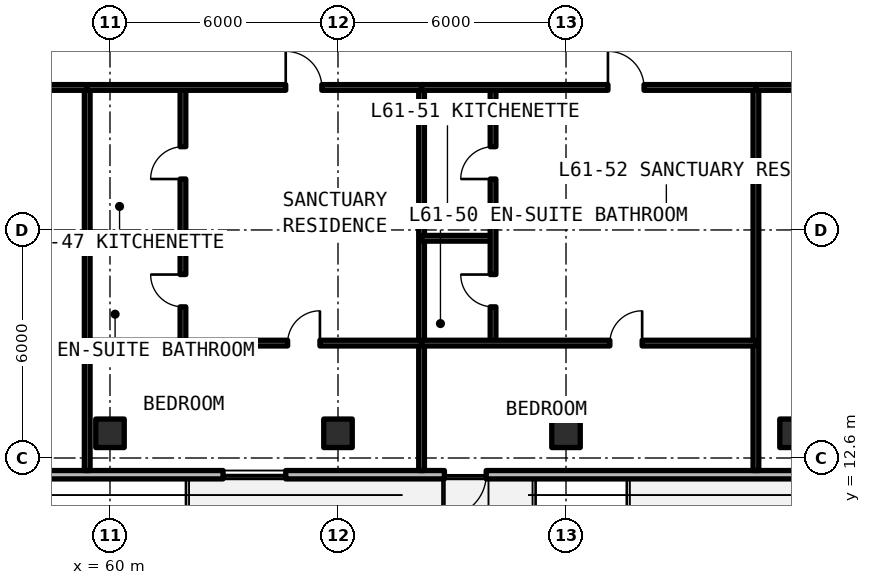
"""IFC4 building model, lengths in metres.
Left out: names, types, materials, properties, quantities, classifications, styles, units other than length and angle.
Written with IfcOpenShell. Run it as: python <this file> out.ifc"""

import sys

from ifc_helpers import new_model, si_unit, direction, frame, frame_2d, origin, origin_2d, place, context, subcontext, project, spatial, rectangle, extrude, element, fill, save


model = new_model("IFC4")
c1 = context("Model", 3, precision=1e-05, world=origin(), true_north=direction((0.0, 1.0)))
c2 = subcontext(c1, "Body", "Model", "MODEL_VIEW")
j1 = project(units=[si_unit("LENGTHUNIT", "METRE"), si_unit("PLANEANGLEUNIT", "RADIAN")], contexts=[c1])
p1 = place(None, origin())
s1 = spatial("IfcSite", under=j1, at=p1, CompositionType="ELEMENT")
p2 = place(p1, origin())
s2 = spatial("IfcBuilding", under=s1, at=p2, CompositionType="ELEMENT")
p3 = place(p2, frame((0.0, 0.0, 219.12)))
s3 = spatial("IfcBuildingStorey", under=s2, at=p3, CompositionType="ELEMENT", Elevation=219.12)
for number, where, z_axis, x_axis in (
    (1, (60.0, 13.25, 0.0), (0.0, 0.0, 1.0), (1.0, 0.0, 0.0)),
    (2, (66.0, 13.25, 0.0), (0.0, 0.0, 1.0), (1.0, 0.0, 0.0)),
    (3, (72.0, 13.25, 0.0), (0.0, 0.0, 1.0), (1.0, 0.0, 0.0)),
    (4, (78.0, 13.25, 0.0), (0.0, 0.0, 1.0), (1.0, 0.0, 0.0)),
):
    element("IfcColumn", number, at=place(p3, frame(where, z_axis=z_axis, x_axis=x_axis)), inside=s3, PredefinedType="COLUMN", context=c2, shape_type="SweptSolid", body=[
        extrude(rectangle(XDim=0.75, YDim=0.75, at=origin_2d()), origin(), (0.0, 0.0, 1.0), 3.63),
    ])
p4 = place(p3, frame((52.11, 12.16, 0.0), z_axis=(0.0, 0.0, 1.0), x_axis=(1.0, 0.0, 0.0)))
e5 = element("IfcWall", 5, at=p4, inside=s3, PredefinedType="SOLIDWALL", context=c2, shape_type="SweptSolid", body=[
    extrude(rectangle(XDim=43.244, YDim=0.22, at=frame_2d((21.622, 0.0))), origin(), (0.0, 0.0, 1.0), 3.41),
])
p5 = place(p4, frame((16.69, 0.0, 0.0)))
e6 = element("IfcOpeningElement", 6, at=p5, cuts=e5, PredefinedType="OPENING", context=c2, shape_type="SweptSolid", body=[
    extrude(rectangle(XDim=1.1, YDim=2.15, at=frame_2d((0.55, 1.075))), frame((0.0, 0.12, 0.0), z_axis=(0.0, -1.0, 0.0), x_axis=(1.0, 0.0, 0.0)), (0.0, 0.0, 1.0), 0.24),
])
p6 = place(p4, frame((27.79, 0.0, 0.0)))
e7 = element("IfcOpeningElement", 7, at=p6, cuts=e5, PredefinedType="OPENING", context=c2, shape_type="SweptSolid", body=[
    extrude(rectangle(XDim=1.1, YDim=2.15, at=frame_2d((0.55, 1.075))), frame((0.0, 0.12, 0.0), z_axis=(0.0, -1.0, 0.0), x_axis=(1.0, 0.0, 0.0)), (0.0, 0.0, 1.0), 0.24),
])
p7 = place(p4, frame((2.826, 0.0, 0.78)))
e8 = element("IfcOpeningElement", 8, at=p7, cuts=e5, PredefinedType="OPENING", context=c2, shape_type="SweptSolid", body=[
    extrude(rectangle(XDim=1.65, YDim=1.66, at=frame_2d((0.825, 0.83))), frame((0.0, 0.12, 0.0), z_axis=(0.0, -1.0, 0.0), x_axis=(1.0, 0.0, 0.0)), (0.0, 0.0, 1.0), 0.24),
])
p8 = place(p4, frame((10.865, 0.0, 0.78)))
e9 = element("IfcOpeningElement", 9, at=p8, cuts=e5, PredefinedType="OPENING", context=c2, shape_type="SweptSolid", body=[
    extrude(rectangle(XDim=1.65, YDim=1.66, at=frame_2d((0.825, 0.83))), frame((0.0, 0.12, 0.0), z_axis=(0.0, -1.0, 0.0), x_axis=(1.0, 0.0, 0.0)), (0.0, 0.0, 1.0), 0.24),
])
p9 = place(p4, frame((38.666, 0.0, 0.78)))
e10 = element("IfcOpeningElement", 10, at=p9, cuts=e5, PredefinedType="OPENING", context=c2, shape_type="SweptSolid", body=[
    extrude(rectangle(XDim=1.65, YDim=1.66, at=frame_2d((0.825, 0.83))), frame((0.0, 0.12, 0.0), z_axis=(0.0, -1.0, 0.0), x_axis=(1.0, 0.0, 0.0)), (0.0, 0.0, 1.0), 0.24),
])
p10 = place(p3, frame((59.401, 12.27, 0.0), z_axis=(0.0, 0.0, 1.0), x_axis=(0.0, 1.0, 0.0)))
e11 = element("IfcWall", 11, at=p10, inside=s3, PredefinedType="SOLIDWALL", context=c2, shape_type="SweptSolid", body=[
    extrude(rectangle(XDim=10.08, YDim=0.15, at=frame_2d((5.04, 0.0))), origin(), (0.0, 0.0, 1.0), 2.63),
])
p11 = place(p3, frame((52.12, 22.35, 0.0), z_axis=(0.0, 0.0, 1.0), x_axis=(1.0, 0.0, 0.0)))
e12 = element("IfcWall", 12, at=p11, inside=s3, PredefinedType="SOLIDWALL", context=c2, shape_type="SweptSolid", body=[
    extrude(rectangle(XDim=7.281, YDim=0.15, at=frame_2d((3.641, 0.0))), origin(), (0.0, 0.0, 1.0), 2.63),
])
p12 = place(p11, frame((3.166, 0.0, 0.0)))
e13 = element("IfcOpeningElement", 13, at=p12, cuts=e12, PredefinedType="OPENING", context=c2, shape_type="SweptSolid", body=[
    extrude(rectangle(XDim=0.95, YDim=2.15, at=frame_2d((0.475, 1.075))), frame((0.0, 0.085, 0.0), z_axis=(0.0, -1.0, 0.0), x_axis=(1.0, 0.0, 0.0)), (0.0, 0.0, 1.0), 0.17),
])
p13 = place(p3, frame((68.199, 12.27, 0.0), z_axis=(0.0, 0.0, 1.0), x_axis=(0.0, 1.0, 0.0)))
e14 = element("IfcWall", 14, at=p13, inside=s3, PredefinedType="SOLIDWALL", context=c2, shape_type="SweptSolid", body=[
    extrude(rectangle(XDim=10.08, YDim=0.15, at=frame_2d((5.04, 0.0))), origin(), (0.0, 0.0, 1.0), 2.63),
])
p14 = place(p3, frame((59.401, 18.381, 0.0), z_axis=(0.0, 0.0, 1.0), x_axis=(1.0, 0.0, 0.0)))
e15 = element("IfcWall", 15, at=p14, inside=s3, PredefinedType="PARTITIONING", context=c2, shape_type="SweptSolid", body=[
    extrude(rectangle(XDim=2.519, YDim=0.15, at=frame_2d((1.259, 0.0))), origin(), (0.0, 0.0, 1.0), 2.63),
])
p15 = place(p3, frame((61.92, 15.623, 0.0), z_axis=(0.0, 0.0, 1.0), x_axis=(0.0, 1.0, 0.0)))
e16 = element("IfcWall", 16, at=p15, inside=s3, PredefinedType="PARTITIONING", context=c2, shape_type="SweptSolid", body=[
    extrude(rectangle(XDim=6.727, YDim=0.15, at=frame_2d((3.364, 0.0))), origin(), (0.0, 0.0, 1.0), 2.63),
])
p16 = place(p15, frame((0.954, 0.0, 0.0)))
e17 = element("IfcOpeningElement", 17, at=p16, cuts=e16, PredefinedType="OPENING", context=c2, shape_type="SweptSolid", body=[
    extrude(rectangle(XDim=0.85, YDim=2.1, at=frame_2d((0.425, 1.05))), frame((0.0, 0.085, 0.0), z_axis=(0.0, -1.0, 0.0), x_axis=(1.0, 0.0, 0.0)), (0.0, 0.0, 1.0), 0.17),
])
p17 = place(p15, frame((4.318, 0.0, 0.0)))
e18 = element("IfcOpeningElement", 18, at=p17, cuts=e16, PredefinedType="OPENING", context=c2, shape_type="SweptSolid", body=[
    extrude(rectangle(XDim=0.85, YDim=2.1, at=frame_2d((0.425, 1.05))), frame((0.0, 0.085, 0.0), z_axis=(0.0, -1.0, 0.0), x_axis=(1.0, 0.0, 0.0)), (0.0, 0.0, 1.0), 0.17),
])
p18 = place(p3, frame((59.401, 15.623, 0.0), z_axis=(0.0, 0.0, 1.0), x_axis=(1.0, 0.0, 0.0)))
e19 = element("IfcWall", 19, at=p18, inside=s3, PredefinedType="PARTITIONING", context=c2, shape_type="SweptSolid", body=[
    extrude(rectangle(XDim=8.798, YDim=0.15, at=frame_2d((4.399, 0.0))), origin(), (0.0, 0.0, 1.0), 2.63),
])
p19 = place(p18, frame((5.273, 0.0, 0.0)))
e20 = element("IfcOpeningElement", 20, at=p19, cuts=e19, PredefinedType="OPENING", context=c2, shape_type="SweptSolid", body=[
    extrude(rectangle(XDim=0.85, YDim=2.1, at=frame_2d((0.425, 1.05))), frame((0.0, 0.085, 0.0), z_axis=(0.0, -1.0, 0.0), x_axis=(1.0, 0.0, 0.0)), (0.0, 0.0, 1.0), 0.17),
])
p20 = place(p3, frame((59.401, 22.35, 0.0), z_axis=(0.0, 0.0, 1.0), x_axis=(1.0, 0.0, 0.0)))
e21 = element("IfcWall", 21, at=p20, inside=s3, PredefinedType="SOLIDWALL", context=c2, shape_type="SweptSolid", body=[
    extrude(rectangle(XDim=8.798, YDim=0.15, at=frame_2d((4.399, 0.0))), origin(), (0.0, 0.0, 1.0), 2.63),
])
p21 = place(p20, frame((5.223, 0.0, 0.0)))
e22 = element("IfcOpeningElement", 22, at=p21, cuts=e21, PredefinedType="OPENING", context=c2, shape_type="SweptSolid", body=[
    extrude(rectangle(XDim=0.95, YDim=2.15, at=frame_2d((0.475, 1.075))), frame((0.0, 0.085, 0.0), z_axis=(0.0, -1.0, 0.0), x_axis=(1.0, 0.0, 0.0)), (0.0, 0.0, 1.0), 0.17),
])
p22 = place(p3, frame((76.997, 12.27, 0.0), z_axis=(0.0, 0.0, 1.0), x_axis=(0.0, 1.0, 0.0)))
e23 = element("IfcWall", 23, at=p22, inside=s3, PredefinedType="SOLIDWALL", context=c2, shape_type="SweptSolid", body=[
    extrude(rectangle(XDim=10.08, YDim=0.15, at=frame_2d((5.04, 0.0))), origin(), (0.0, 0.0, 1.0), 2.63),
])
p23 = place(p3, frame((68.199, 18.381, 0.0), z_axis=(0.0, 0.0, 1.0), x_axis=(1.0, 0.0, 0.0)))
e24 = element("IfcWall", 24, at=p23, inside=s3, PredefinedType="PARTITIONING", context=c2, shape_type="SweptSolid", body=[
    extrude(rectangle(XDim=1.881, YDim=0.15, at=frame_2d((0.94, 0.0))), origin(), (0.0, 0.0, 1.0), 2.63),
])
p24 = place(p3, frame((70.08, 15.623, 0.0), z_axis=(0.0, 0.0, 1.0), x_axis=(0.0, 1.0, 0.0)))
e25 = element("IfcWall", 25, at=p24, inside=s3, PredefinedType="PARTITIONING", context=c2, shape_type="SweptSolid", body=[
    extrude(rectangle(XDim=6.727, YDim=0.15, at=frame_2d((3.364, 0.0))), origin(), (0.0, 0.0, 1.0), 2.63),
])
p25 = place(p24, frame((0.954, 0.0, 0.0)))
e26 = element("IfcOpeningElement", 26, at=p25, cuts=e25, PredefinedType="OPENING", context=c2, shape_type="SweptSolid", body=[
    extrude(rectangle(XDim=0.85, YDim=2.1, at=frame_2d((0.425, 1.05))), frame((0.0, 0.085, 0.0), z_axis=(0.0, -1.0, 0.0), x_axis=(1.0, 0.0, 0.0)), (0.0, 0.0, 1.0), 0.17),
])
p26 = place(p24, frame((4.318, 0.0, 0.0)))
e27 = element("IfcOpeningElement", 27, at=p26, cuts=e25, PredefinedType="OPENING", context=c2, shape_type="SweptSolid", body=[
    extrude(rectangle(XDim=0.85, YDim=2.1, at=frame_2d((0.425, 1.05))), frame((0.0, 0.085, 0.0), z_axis=(0.0, -1.0, 0.0), x_axis=(1.0, 0.0, 0.0)), (0.0, 0.0, 1.0), 0.17),
])
p27 = place(p3, frame((68.199, 15.623, 0.0), z_axis=(0.0, 0.0, 1.0), x_axis=(1.0, 0.0, 0.0)))
e28 = element("IfcWall", 28, at=p27, inside=s3, PredefinedType="PARTITIONING", context=c2, shape_type="SweptSolid", body=[
    extrude(rectangle(XDim=8.798, YDim=0.15, at=frame_2d((4.399, 0.0))), origin(), (0.0, 0.0, 1.0), 2.63),
])
p28 = place(p27, frame((4.954, 0.0, 0.0)))
e29 = element("IfcOpeningElement", 29, at=p28, cuts=e28, PredefinedType="OPENING", context=c2, shape_type="SweptSolid", body=[
    extrude(rectangle(XDim=0.85, YDim=2.1, at=frame_2d((0.425, 1.05))), frame((0.0, 0.085, 0.0), z_axis=(0.0, -1.0, 0.0), x_axis=(1.0, 0.0, 0.0)), (0.0, 0.0, 1.0), 0.17),
])
p29 = place(p3, frame((68.199, 22.35, 0.0), z_axis=(0.0, 0.0, 1.0), x_axis=(1.0, 0.0, 0.0)))
e30 = element("IfcWall", 30, at=p29, inside=s3, PredefinedType="SOLIDWALL", context=c2, shape_type="SweptSolid", body=[
    extrude(rectangle(XDim=8.798, YDim=0.15, at=frame_2d((4.399, 0.0))), origin(), (0.0, 0.0, 1.0), 2.63),
])
p30 = place(p29, frame((4.904, 0.0, 0.0)))
e31 = element("IfcOpeningElement", 31, at=p30, cuts=e30, PredefinedType="OPENING", context=c2, shape_type="SweptSolid", body=[
    extrude(rectangle(XDim=0.95, YDim=2.15, at=frame_2d((0.475, 1.075))), frame((0.0, 0.085, 0.0), z_axis=(0.0, -1.0, 0.0), x_axis=(1.0, 0.0, 0.0)), (0.0, 0.0, 1.0), 0.17),
])
p31 = place(p3, frame((76.997, 22.35, 0.0), z_axis=(0.0, 0.0, 1.0), x_axis=(1.0, 0.0, 0.0)))
e32 = element("IfcWall", 32, at=p31, inside=s3, PredefinedType="SOLIDWALL", context=c2, shape_type="SweptSolid", body=[
    extrude(rectangle(XDim=9.405, YDim=0.15, at=frame_2d((4.702, 0.0))), origin(), (0.0, 0.0, 1.0), 2.63),
])
p32 = place(p31, frame((4.152, 0.0, 0.0)))
e33 = element("IfcOpeningElement", 33, at=p32, cuts=e32, PredefinedType="OPENING", context=c2, shape_type="SweptSolid", body=[
    extrude(rectangle(XDim=1.1, YDim=2.15, at=frame_2d((0.55, 1.075))), frame((0.0, 0.085, 0.0), z_axis=(0.0, -1.0, 0.0), x_axis=(1.0, 0.0, 0.0)), (0.0, 0.0, 1.0), 0.17),
])
p33 = place(p5, frame((1.1, 0.0, 0.0), z_axis=(0.0, 0.0, 1.0), x_axis=(-1.0, 0.0, 0.0)))
e34 = element("IfcDoor", 34, at=p33, inside=s3, OperationType="SINGLE_SWING_RIGHT", PredefinedType="DOOR", context=c2, shape_type="SweptSolid", body=[
    extrude(rectangle(XDim=1.1, YDim=2.15, at=frame_2d((0.55, 1.075))), frame((0.0, 0.025, 0.0), z_axis=(0.0, -1.0, 0.0), x_axis=(1.0, 0.0, 0.0)), (0.0, 0.0, 1.0), 0.05),
])
fill(e6, e34)
p34 = place(p8, origin())
e35 = element("IfcWindow", 35, at=p34, inside=s3, PartitioningType="SINGLE_PANEL", PredefinedType="WINDOW", context=c2, shape_type="SweptSolid", body=[
    extrude(rectangle(XDim=1.65, YDim=1.66, at=frame_2d((0.825, 0.83))), frame((0.0, 0.03, 0.0), z_axis=(0.0, -1.0, 0.0), x_axis=(1.0, 0.0, 0.0)), (0.0, 0.0, 1.0), 0.06),
])
fill(e9, e35)
p35 = place(p16, origin())
e36 = element("IfcDoor", 36, at=p35, inside=s3, OperationType="SINGLE_SWING_RIGHT", PredefinedType="DOOR", context=c2, shape_type="SweptSolid", body=[
    extrude(rectangle(XDim=0.85, YDim=2.1, at=frame_2d((0.425, 1.05))), frame((0.0, 0.025, 0.0), z_axis=(0.0, -1.0, 0.0), x_axis=(1.0, 0.0, 0.0)), (0.0, 0.0, 1.0), 0.05),
])
fill(e17, e36)
p36 = place(p17, origin())
e37 = element("IfcDoor", 37, at=p36, inside=s3, OperationType="SINGLE_SWING_LEFT", PredefinedType="DOOR", context=c2, shape_type="SweptSolid", body=[
    extrude(rectangle(XDim=0.85, YDim=2.1, at=frame_2d((0.425, 1.05))), frame((0.0, 0.025, 0.0), z_axis=(0.0, -1.0, 0.0), x_axis=(1.0, 0.0, 0.0)), (0.0, 0.0, 1.0), 0.05),
])
fill(e18, e37)
p37 = place(p19, origin())
e38 = element("IfcDoor", 38, at=p37, inside=s3, OperationType="SINGLE_SWING_RIGHT", PredefinedType="DOOR", context=c2, shape_type="SweptSolid", body=[
    extrude(rectangle(XDim=0.85, YDim=2.1, at=frame_2d((0.425, 1.05))), frame((0.0, 0.025, 0.0), z_axis=(0.0, -1.0, 0.0), x_axis=(1.0, 0.0, 0.0)), (0.0, 0.0, 1.0), 0.05),
])
fill(e20, e38)
p38 = place(p21, origin())
e39 = element("IfcDoor", 39, at=p38, inside=s3, OperationType="SINGLE_SWING_LEFT", PredefinedType="DOOR", context=c2, shape_type="SweptSolid", body=[
    extrude(rectangle(XDim=0.95, YDim=2.15, at=frame_2d((0.475, 1.075))), frame((0.0, 0.025, 0.0), z_axis=(0.0, -1.0, 0.0), x_axis=(1.0, 0.0, 0.0)), (0.0, 0.0, 1.0), 0.05),
])
fill(e22, e39)
p39 = place(p25, origin())
e40 = element("IfcDoor", 40, at=p39, inside=s3, OperationType="SINGLE_SWING_RIGHT", PredefinedType="DOOR", context=c2, shape_type="SweptSolid", body=[
    extrude(rectangle(XDim=0.85, YDim=2.1, at=frame_2d((0.425, 1.05))), frame((0.0, 0.025, 0.0), z_axis=(0.0, -1.0, 0.0), x_axis=(1.0, 0.0, 0.0)), (0.0, 0.0, 1.0), 0.05),
])
fill(e26, e40)
p40 = place(p26, origin())
e41 = element("IfcDoor", 41, at=p40, inside=s3, OperationType="SINGLE_SWING_LEFT", PredefinedType="DOOR", context=c2, shape_type="SweptSolid", body=[
    extrude(rectangle(XDim=0.85, YDim=2.1, at=frame_2d((0.425, 1.05))), frame((0.0, 0.025, 0.0), z_axis=(0.0, -1.0, 0.0), x_axis=(1.0, 0.0, 0.0)), (0.0, 0.0, 1.0), 0.05),
])
fill(e27, e41)
p41 = place(p28, origin())
e42 = element("IfcDoor", 42, at=p41, inside=s3, OperationType="SINGLE_SWING_RIGHT", PredefinedType="DOOR", context=c2, shape_type="SweptSolid", body=[
    extrude(rectangle(XDim=0.85, YDim=2.1, at=frame_2d((0.425, 1.05))), frame((0.0, 0.025, 0.0), z_axis=(0.0, -1.0, 0.0), x_axis=(1.0, 0.0, 0.0)), (0.0, 0.0, 1.0), 0.05),
])
fill(e29, e42)
p42 = place(p30, origin())
e43 = element("IfcDoor", 43, at=p42, inside=s3, OperationType="SINGLE_SWING_LEFT", PredefinedType="DOOR", context=c2, shape_type="SweptSolid", body=[
    extrude(rectangle(XDim=0.95, YDim=2.15, at=frame_2d((0.475, 1.075))), frame((0.0, 0.025, 0.0), z_axis=(0.0, -1.0, 0.0), x_axis=(1.0, 0.0, 0.0)), (0.0, 0.0, 1.0), 0.05),
])
fill(e31, e43)
save(model, sys.argv[1])
